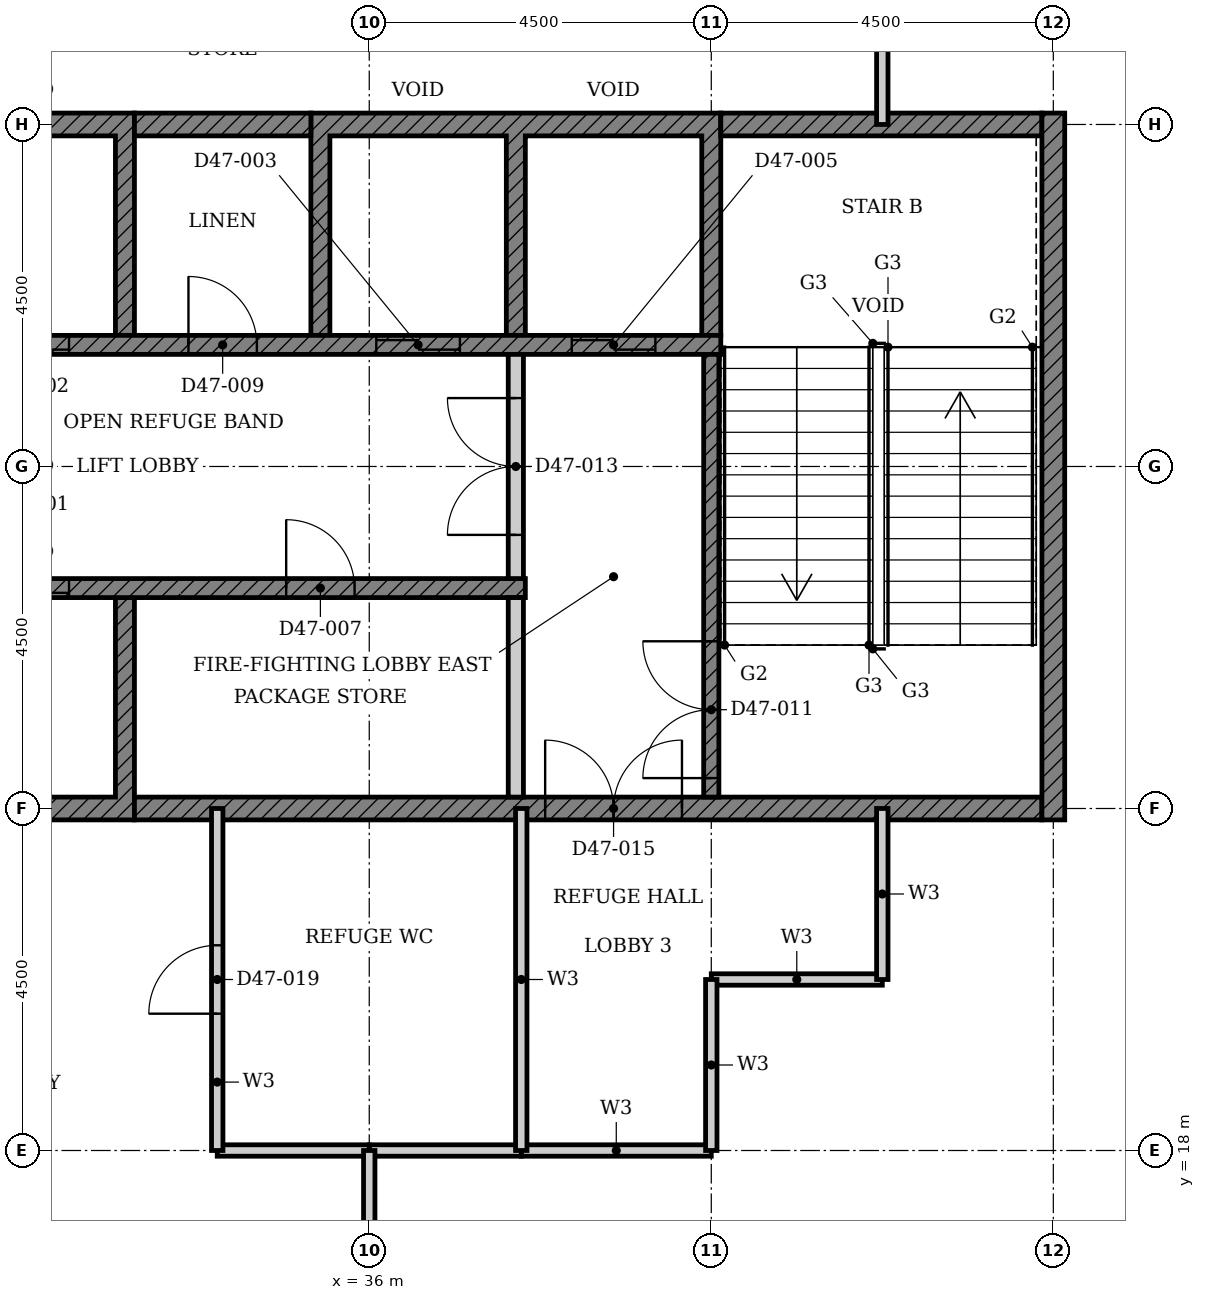
"""IFC4 building model, lengths in metres.
Left out: names, types, materials, properties, quantities, classifications, styles, units other than length and angle.
Written with IfcOpenShell. Run it as: python <this file> out.ifc"""

import sys

from ifc_helpers import new_model, si_unit, direction, frame, frame_2d, origin, place, context, subcontext, project, spatial, polyline, rectangle, outline, extrude, element, fill, save


model = new_model("IFC4")
c1 = context("Model", 3, precision=1e-05, world=origin(), true_north=direction((0.0, 1.0)))
c2 = subcontext(c1, "Body", "Model", "MODEL_VIEW")
j1 = project(units=[si_unit("LENGTHUNIT", "METRE"), si_unit("PLANEANGLEUNIT", "RADIAN")], contexts=[c1])
p1 = place(None, origin())
s1 = spatial("IfcSite", under=j1, at=p1, CompositionType="ELEMENT")
p2 = place(p1, origin())
s2 = spatial("IfcBuilding", under=s1, at=p2, CompositionType="ELEMENT")
p3 = place(p2, frame((0.0, 0.0, 187.6)))
s3 = spatial("IfcBuildingStorey", under=s2, at=p3, CompositionType="ELEMENT", Elevation=187.6)
p4 = place(p3, origin())
e1 = element("IfcWall", 1, at=p4, inside=s3, PredefinedType="SHEAR", context=c2, shape_type="SweptSolid", body=[
    extrude(outline(polyline([(27.518, 22.35), (32.911, 22.35), (32.911, 25.275), (32.661, 25.275), (32.661, 22.65), (30.339, 22.65), (30.339, 25.275), (30.089, 25.275), (30.089, 22.65), (27.768, 22.65), (27.768, 25.275), (27.518, 25.275), (27.518, 22.35)])), origin(), (0.0, 0.0, 1.0), 4.5),
])
p5 = place(p3, origin())
e2 = element("IfcWall", 2, at=p5, inside=s3, PredefinedType="SHEAR", context=c2, shape_type="SweptSolid", body=[
    extrude(outline(polyline([(27.518, 28.725), (27.768, 28.725), (27.768, 31.35), (30.089, 31.35), (30.089, 28.725), (30.339, 28.725), (30.339, 31.35), (32.661, 31.35), (32.661, 28.725), (32.911, 28.725), (32.911, 31.65), (27.518, 31.65), (27.518, 28.725)])), origin(), (0.0, 0.0, 1.0), 4.5),
])
p6 = place(p3, origin())
e3 = element("IfcWall", 3, at=p6, inside=s3, PredefinedType="SHEAR", context=c2, shape_type="SweptSolid", body=[
    extrude(outline(polyline([(35.232, 28.725), (35.482, 28.725), (35.482, 31.35), (37.803, 31.35), (37.803, 28.725), (38.053, 28.725), (38.053, 31.35), (40.375, 31.35), (40.375, 28.725), (40.625, 28.725), (40.625, 31.65), (35.232, 31.65), (35.232, 28.725)])), origin(), (0.0, 0.0, 1.0), 4.5),
])
p7 = place(p3, frame((32.911, 22.5, 0.0), z_axis=(0.0, 0.0, 1.0), x_axis=(1.0, 0.0, 0.0)))
e4 = element("IfcWall", 4, at=p7, inside=s3, PredefinedType="SHEAR", context=c2, shape_type="SweptSolid", body=[
    extrude(rectangle(XDim=11.939, YDim=0.3, at=frame_2d((5.97, 0.0))), origin(), (0.0, 0.0, 1.0), 4.5),
])
p8 = place(p7, frame((5.404, 0.0, 0.0)))
e5 = element("IfcOpeningElement", 5, at=p8, cuts=e4, PredefinedType="OPENING", context=c2, shape_type="SweptSolid", body=[
    extrude(rectangle(XDim=1.8, YDim=2.1, at=frame_2d((0.9, 1.05))), frame((0.0, 0.16, 0.0), z_axis=(0.0, -1.0, 0.0), x_axis=(1.0, 0.0, 0.0)), (0.0, 0.0, 1.0), 0.32),
])
p9 = place(p3, frame((32.911, 31.5, 0.0), z_axis=(0.0, 0.0, 1.0), x_axis=(1.0, 0.0, 0.0)))
e6 = element("IfcWall", 6, at=p9, inside=s3, PredefinedType="SHEAR", context=c2, shape_type="SweptSolid", body=[
    extrude(rectangle(XDim=2.322, YDim=0.3, at=frame_2d((1.161, 0.0))), origin(), (0.0, 0.0, 1.0), 4.5),
])
p10 = place(p3, frame((40.625, 31.5, 0.0), z_axis=(0.0, 0.0, 1.0), x_axis=(1.0, 0.0, 0.0)))
e7 = element("IfcWall", 7, at=p10, inside=s3, PredefinedType="SHEAR", context=c2, shape_type="SweptSolid", body=[
    extrude(rectangle(XDim=4.225, YDim=0.3, at=frame_2d((2.113, 0.0))), origin(), (0.0, 0.0, 1.0), 4.5),
])
p11 = place(p3, frame((45.0, 22.35, 0.0), z_axis=(0.0, 0.0, 1.0), x_axis=(0.0, 1.0, 0.0)))
e8 = element("IfcWall", 8, at=p11, inside=s3, PredefinedType="SHEAR", context=c2, shape_type="SweptSolid", body=[
    extrude(rectangle(XDim=9.3, YDim=0.3, at=frame_2d((4.65, 0.0))), origin(), (0.0, 0.0, 1.0), 4.5),
])
p12 = place(p3, frame((22.375, 25.4, 0.0), z_axis=(0.0, 0.0, 1.0), x_axis=(1.0, 0.0, 0.0)))
e9 = element("IfcWall", 9, at=p12, inside=s3, PredefinedType="SHEAR", context=c2, shape_type="SweptSolid", body=[
    extrude(rectangle(XDim=15.678, YDim=0.25, at=frame_2d((7.839, 0.0))), origin(), (0.0, 0.0, 1.0), 4.5),
])
p13 = place(p12, frame((8.575, 0.0, 0.0)))
e10 = element("IfcOpeningElement", 10, at=p13, cuts=e9, PredefinedType="OPENING", context=c2, shape_type="SweptSolid", body=[
    extrude(rectangle(XDim=1.1, YDim=2.1, at=frame_2d((0.55, 1.05))), frame((0.0, 0.135, 0.0), z_axis=(0.0, -1.0, 0.0), x_axis=(1.0, 0.0, 0.0)), (0.0, 0.0, 1.0), 0.27),
])
p14 = place(p12, frame((0.861, 0.0, 0.0)))
e11 = element("IfcOpeningElement", 11, at=p14, cuts=e9, PredefinedType="OPENING", context=c2, shape_type="SweptSolid", body=[
    extrude(rectangle(XDim=1.1, YDim=2.1, at=frame_2d((0.55, 1.05))), frame((0.0, 0.135, 0.0), z_axis=(0.0, -1.0, 0.0), x_axis=(1.0, 0.0, 0.0)), (0.0, 0.0, 1.0), 0.27),
])
p15 = place(p12, frame((3.532, 0.0, 0.0)))
e12 = element("IfcOpeningElement", 12, at=p15, cuts=e9, PredefinedType="OPENING", context=c2, shape_type="SweptSolid", body=[
    extrude(rectangle(XDim=0.9, YDim=2.1, at=frame_2d((0.45, 1.05))), frame((0.0, 0.135, 0.0), z_axis=(0.0, -1.0, 0.0), x_axis=(1.0, 0.0, 0.0)), (0.0, 0.0, 1.0), 0.27),
])
p16 = place(p12, frame((12.532, 0.0, 0.0)))
e13 = element("IfcOpeningElement", 13, at=p16, cuts=e9, PredefinedType="OPENING", context=c2, shape_type="SweptSolid", body=[
    extrude(rectangle(XDim=0.9, YDim=2.1, at=frame_2d((0.45, 1.05))), frame((0.0, 0.135, 0.0), z_axis=(0.0, -1.0, 0.0), x_axis=(1.0, 0.0, 0.0)), (0.0, 0.0, 1.0), 0.27),
])
p17 = place(p3, frame((24.947, 28.6, 0.0), z_axis=(0.0, 0.0, 1.0), x_axis=(1.0, 0.0, 0.0)))
e14 = element("IfcWall", 14, at=p17, inside=s3, PredefinedType="SHEAR", context=c2, shape_type="SweptSolid", body=[
    extrude(rectangle(XDim=15.678, YDim=0.25, at=frame_2d((7.839, 0.0))), origin(), (0.0, 0.0, 1.0), 4.5),
])
p18 = place(p17, frame((6.004, 0.0, 0.0)))
e15 = element("IfcOpeningElement", 15, at=p18, cuts=e14, PredefinedType="OPENING", context=c2, shape_type="SweptSolid", body=[
    extrude(rectangle(XDim=1.1, YDim=2.1, at=frame_2d((0.55, 1.05))), frame((0.0, 0.135, 0.0), z_axis=(0.0, -1.0, 0.0), x_axis=(1.0, 0.0, 0.0)), (0.0, 0.0, 1.0), 0.27),
])
p19 = place(p17, frame((11.146, 0.0, 0.0)))
e16 = element("IfcOpeningElement", 16, at=p19, cuts=e14, PredefinedType="OPENING", context=c2, shape_type="SweptSolid", body=[
    extrude(rectangle(XDim=1.1, YDim=2.1, at=frame_2d((0.55, 1.05))), frame((0.0, 0.135, 0.0), z_axis=(0.0, -1.0, 0.0), x_axis=(1.0, 0.0, 0.0)), (0.0, 0.0, 1.0), 0.27),
])
p20 = place(p17, frame((13.718, 0.0, 0.0)))
e17 = element("IfcOpeningElement", 17, at=p20, cuts=e14, PredefinedType="OPENING", context=c2, shape_type="SweptSolid", body=[
    extrude(rectangle(XDim=1.1, YDim=2.1, at=frame_2d((0.55, 1.05))), frame((0.0, 0.135, 0.0), z_axis=(0.0, -1.0, 0.0), x_axis=(1.0, 0.0, 0.0)), (0.0, 0.0, 1.0), 0.27),
])
p21 = place(p17, frame((0.961, 0.0, 0.0)))
e18 = element("IfcOpeningElement", 18, at=p21, cuts=e14, PredefinedType="OPENING", context=c2, shape_type="SweptSolid", body=[
    extrude(rectangle(XDim=0.9, YDim=2.1, at=frame_2d((0.45, 1.05))), frame((0.0, 0.135, 0.0), z_axis=(0.0, -1.0, 0.0), x_axis=(1.0, 0.0, 0.0)), (0.0, 0.0, 1.0), 0.27),
])
p22 = place(p17, frame((8.675, 0.0, 0.0)))
e19 = element("IfcOpeningElement", 19, at=p22, cuts=e14, PredefinedType="OPENING", context=c2, shape_type="SweptSolid", body=[
    extrude(rectangle(XDim=0.9, YDim=2.1, at=frame_2d((0.45, 1.05))), frame((0.0, 0.135, 0.0), z_axis=(0.0, -1.0, 0.0), x_axis=(1.0, 0.0, 0.0)), (0.0, 0.0, 1.0), 0.27),
])
p23 = place(p3, frame((37.928, 22.65, 0.0), z_axis=(0.0, 0.0, 1.0), x_axis=(0.0, 1.0, 0.0)))
e20 = element("IfcWall", 20, at=p23, inside=s3, PredefinedType="PARTITIONING", context=c2, shape_type="SweptSolid", body=[
    extrude(rectangle(XDim=2.625, YDim=0.2, at=frame_2d((1.312, 0.0))), origin(), (0.0, 0.0, 1.0), 4.5),
])
p24 = place(p3, frame((40.5, 22.65, 0.0), z_axis=(0.0, 0.0, 1.0), x_axis=(0.0, 1.0, 0.0)))
e21 = element("IfcWall", 21, at=p24, inside=s3, PredefinedType="SHEAR", context=c2, shape_type="SweptSolid", body=[
    extrude(rectangle(XDim=5.825, YDim=0.2, at=frame_2d((2.913, 0.0))), origin(), (0.0, 0.0, 1.0), 4.5),
])
p25 = place(p24, frame((0.25, 0.0, 0.0)))
e22 = element("IfcOpeningElement", 22, at=p25, cuts=e21, PredefinedType="OPENING", context=c2, shape_type="SweptSolid", body=[
    extrude(rectangle(XDim=1.8, YDim=2.1, at=frame_2d((0.9, 1.05))), frame((0.0, 0.11, 0.0), z_axis=(0.0, -1.0, 0.0), x_axis=(1.0, 0.0, 0.0)), (0.0, 0.0, 1.0), 0.22),
])
p26 = place(p3, frame((37.928, 25.525, 0.0), z_axis=(0.0, 0.0, 1.0), x_axis=(0.0, 1.0, 0.0)))
e23 = element("IfcWall", 23, at=p26, inside=s3, PredefinedType="PARTITIONING", context=c2, shape_type="SweptSolid", body=[
    extrude(rectangle(XDim=2.95, YDim=0.2, at=frame_2d((1.475, 0.0))), origin(), (0.0, 0.0, 1.0), 4.5),
])
p27 = place(p26, frame((0.575, 0.0, 0.0)))
e24 = element("IfcOpeningElement", 24, at=p27, cuts=e23, PredefinedType="OPENING", context=c2, shape_type="SweptSolid", body=[
    extrude(rectangle(XDim=1.8, YDim=2.1, at=frame_2d((0.9, 1.05))), frame((0.0, 0.11, 0.0), z_axis=(0.0, -1.0, 0.0), x_axis=(1.0, 0.0, 0.0)), (0.0, 0.0, 1.0), 0.22),
])
p28 = place(p3, frame((38.0, 18.0, 0.0), z_axis=(0.0, 0.0, 1.0), x_axis=(1.0, 0.0, 0.0)))
e25 = element("IfcWall", 25, at=p28, inside=s3, PredefinedType="PARTITIONING", context=c2, shape_type="SweptSolid", body=[
    extrude(rectangle(XDim=2.5, YDim=0.15, at=frame_2d((1.25, 0.0))), origin(), (0.0, 0.0, 1.0), 4.5),
])
for number, where, z_axis, x_axis in (
    (26, (36.0, 18.0, 0.0), (0.0, 0.0, 1.0), (1.0, 0.0, 0.0)),
    (27, (34.0, 18.0, 0.0), (0.0, 0.0, 1.0), (1.0, 0.0, 0.0)),
):
    element("IfcWall", number, at=place(p3, frame(where, z_axis=z_axis, x_axis=x_axis)), inside=s3, PredefinedType="PARTITIONING", context=c2, shape_type="SweptSolid", body=[
        extrude(rectangle(XDim=2.0, YDim=0.15, at=frame_2d((1.0, 0.0))), origin(), (0.0, 0.0, 1.0), 4.5),
    ])
p29 = place(p3, frame((40.5, 20.25, 0.0), z_axis=(0.0, 0.0, 1.0), x_axis=(1.0, 0.0, 0.0)))
e28 = element("IfcWall", 28, at=p29, inside=s3, PredefinedType="PARTITIONING", context=c2, shape_type="SweptSolid", body=[
    extrude(rectangle(XDim=2.25, YDim=0.15, at=frame_2d((1.125, 0.0))), origin(), (0.0, 0.0, 1.0), 4.5),
])
p30 = place(p3, frame((34.0, 18.0, 0.0), z_axis=(0.0, 0.0, 1.0), x_axis=(0.0, 1.0, 0.0)))
e29 = element("IfcWall", 29, at=p30, inside=s3, PredefinedType="PARTITIONING", context=c2, shape_type="SweptSolid", body=[
    extrude(rectangle(XDim=4.5, YDim=0.15, at=frame_2d((2.25, 0.0))), origin(), (0.0, 0.0, 1.0), 4.5),
])
p31 = place(p30, frame((1.8, 0.0, 0.0)))
e30 = element("IfcOpeningElement", 30, at=p31, cuts=e29, PredefinedType="OPENING", context=c2, shape_type="SweptSolid", body=[
    extrude(rectangle(XDim=0.9, YDim=2.1, at=frame_2d((0.45, 1.05))), frame((0.0, 0.085, 0.0), z_axis=(0.0, -1.0, 0.0), x_axis=(1.0, 0.0, 0.0)), (0.0, 0.0, 1.0), 0.17),
])
p32 = place(p3, frame((36.0, 9.0, 0.0), z_axis=(0.0, 0.0, 1.0), x_axis=(0.0, 1.0, 0.0)))
e31 = element("IfcWall", 31, at=p32, inside=s3, PredefinedType="PARTITIONING", context=c2, shape_type="SweptSolid", body=[
    extrude(rectangle(XDim=9.0, YDim=0.15, at=frame_2d((4.5, 0.0))), origin(), (0.0, 0.0, 1.0), 3.78),
])
p33 = place(p32, frame((3.9, 0.0, 0.0)))
e32 = element("IfcOpeningElement", 32, at=p33, cuts=e31, PredefinedType="OPENING", context=c2, shape_type="SweptSolid", body=[
    extrude(rectangle(XDim=1.2, YDim=2.1, at=frame_2d((0.6, 1.05))), frame((0.0, 0.085, 0.0), z_axis=(0.0, -1.0, 0.0), x_axis=(1.0, 0.0, 0.0)), (0.0, 0.0, 1.0), 0.17),
])
p34 = place(p3, frame((38.0, 18.0, 0.0), z_axis=(0.0, 0.0, 1.0), x_axis=(0.0, 1.0, 0.0)))
e33 = element("IfcWall", 33, at=p34, inside=s3, PredefinedType="PARTITIONING", context=c2, shape_type="SweptSolid", body=[
    extrude(rectangle(XDim=4.5, YDim=0.15, at=frame_2d((2.25, 0.0))), origin(), (0.0, 0.0, 1.0), 4.5),
])
for number, where, z_axis, x_axis in (
    (34, (40.5, 18.0, 0.0), (0.0, 0.0, 1.0), (0.0, 1.0, 0.0)),
    (35, (42.75, 31.5, 0.0), (0.0, 0.0, 1.0), (0.0, 1.0, 0.0)),
    (36, (42.75, 20.25, 0.0), (0.0, 0.0, 1.0), (0.0, 1.0, 0.0)),
):
    element("IfcWall", number, at=place(p3, frame(where, z_axis=z_axis, x_axis=x_axis)), inside=s3, PredefinedType="PARTITIONING", context=c2, shape_type="SweptSolid", body=[
        extrude(rectangle(XDim=2.25, YDim=0.15, at=frame_2d((1.125, 0.0))), origin(), (0.0, 0.0, 1.0), 4.5),
    ])
p35 = place(p13, origin())
e37 = element("IfcDoor", 37, at=p35, inside=s3, OperationType="DOUBLE_DOOR_SLIDING", PredefinedType="DOOR", context=c2, shape_type="SweptSolid", body=[
    extrude(rectangle(XDim=1.1, YDim=2.1, at=frame_2d((0.55, 1.05))), frame((0.0, 0.025, 0.0), z_axis=(0.0, -1.0, 0.0), x_axis=(1.0, 0.0, 0.0)), (0.0, 0.0, 1.0), 0.05),
])
fill(e10, e37)
p36 = place(p18, origin())
e38 = element("IfcDoor", 38, at=p36, inside=s3, OperationType="DOUBLE_DOOR_SLIDING", PredefinedType="DOOR", context=c2, shape_type="SweptSolid", body=[
    extrude(rectangle(XDim=1.1, YDim=2.1, at=frame_2d((0.55, 1.05))), frame((0.0, 0.025, 0.0), z_axis=(0.0, -1.0, 0.0), x_axis=(1.0, 0.0, 0.0)), (0.0, 0.0, 1.0), 0.05),
])
fill(e15, e38)
p37 = place(p19, origin())
e39 = element("IfcDoor", 39, at=p37, inside=s3, OperationType="DOUBLE_DOOR_SLIDING", PredefinedType="DOOR", context=c2, shape_type="SweptSolid", body=[
    extrude(rectangle(XDim=1.1, YDim=2.1, at=frame_2d((0.55, 1.05))), frame((0.0, 0.025, 0.0), z_axis=(0.0, -1.0, 0.0), x_axis=(1.0, 0.0, 0.0)), (0.0, 0.0, 1.0), 0.05),
])
fill(e16, e39)
p38 = place(p20, origin())
e40 = element("IfcDoor", 40, at=p38, inside=s3, OperationType="DOUBLE_DOOR_SLIDING", PredefinedType="DOOR", context=c2, shape_type="SweptSolid", body=[
    extrude(rectangle(XDim=1.1, YDim=2.1, at=frame_2d((0.55, 1.05))), frame((0.0, 0.025, 0.0), z_axis=(0.0, -1.0, 0.0), x_axis=(1.0, 0.0, 0.0)), (0.0, 0.0, 1.0), 0.05),
])
fill(e17, e40)
p39 = place(p16, origin())
e41 = element("IfcDoor", 41, at=p39, inside=s3, OperationType="SINGLE_SWING_LEFT", PredefinedType="DOOR", context=c2, shape_type="SweptSolid", body=[
    extrude(rectangle(XDim=0.9, YDim=2.1, at=frame_2d((0.45, 1.05))), frame((0.0, 0.025, 0.0), z_axis=(0.0, -1.0, 0.0), x_axis=(1.0, 0.0, 0.0)), (0.0, 0.0, 1.0), 0.05),
])
fill(e13, e41)
p40 = place(p22, origin())
e42 = element("IfcDoor", 42, at=p40, inside=s3, OperationType="SINGLE_SWING_LEFT", PredefinedType="DOOR", context=c2, shape_type="SweptSolid", body=[
    extrude(rectangle(XDim=0.9, YDim=2.1, at=frame_2d((0.45, 1.05))), frame((0.0, 0.025, 0.0), z_axis=(0.0, -1.0, 0.0), x_axis=(1.0, 0.0, 0.0)), (0.0, 0.0, 1.0), 0.05),
])
fill(e19, e42)
p41 = place(p25, origin())
e43 = element("IfcDoor", 43, at=p41, inside=s3, OperationType="DOUBLE_DOOR_SINGLE_SWING", PredefinedType="DOOR", context=c2, shape_type="SweptSolid", body=[
    extrude(rectangle(XDim=1.8, YDim=2.1, at=frame_2d((0.9, 1.05))), frame((0.0, 0.025, 0.0), z_axis=(0.0, -1.0, 0.0), x_axis=(1.0, 0.0, 0.0)), (0.0, 0.0, 1.0), 0.05),
])
fill(e22, e43)
p42 = place(p27, origin())
e44 = element("IfcDoor", 44, at=p42, inside=s3, OperationType="DOUBLE_DOOR_SINGLE_SWING", PredefinedType="DOOR", context=c2, shape_type="SweptSolid", body=[
    extrude(rectangle(XDim=1.8, YDim=2.1, at=frame_2d((0.9, 1.05))), frame((0.0, 0.025, 0.0), z_axis=(0.0, -1.0, 0.0), x_axis=(1.0, 0.0, 0.0)), (0.0, 0.0, 1.0), 0.05),
])
fill(e24, e44)
p43 = place(p8, origin())
e45 = element("IfcDoor", 45, at=p43, inside=s3, OperationType="DOUBLE_DOOR_SINGLE_SWING", PredefinedType="DOOR", context=c2, shape_type="SweptSolid", body=[
    extrude(rectangle(XDim=1.8, YDim=2.1, at=frame_2d((0.9, 1.05))), frame((0.0, 0.025, 0.0), z_axis=(0.0, -1.0, 0.0), x_axis=(1.0, 0.0, 0.0)), (0.0, 0.0, 1.0), 0.05),
])
fill(e5, e45)
p44 = place(p31, origin())
e46 = element("IfcDoor", 46, at=p44, inside=s3, OperationType="SINGLE_SWING_LEFT", PredefinedType="DOOR", context=c2, shape_type="SweptSolid", body=[
    extrude(rectangle(XDim=0.9, YDim=2.1, at=frame_2d((0.45, 1.05))), frame((0.0, 0.025, 0.0), z_axis=(0.0, -1.0, 0.0), x_axis=(1.0, 0.0, 0.0)), (0.0, 0.0, 1.0), 0.05),
])
fill(e30, e46)
save(model, sys.argv[1])
